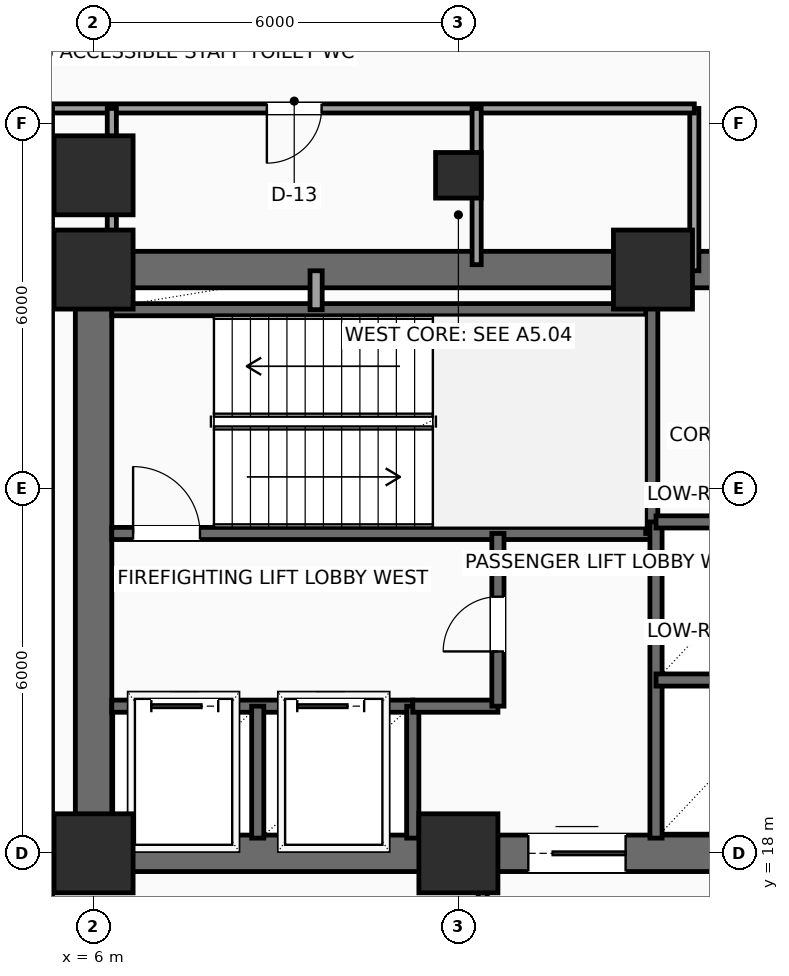
"""IFC4 building model, lengths in metres.
Left out: names, types, materials, properties, quantities, classifications, styles, units other than length and angle.
Written with IfcOpenShell. Run it as: python <this file> out.ifc"""

import sys

from ifc_helpers import new_model, si_unit, direction, frame, frame_2d, origin, origin_2d, place, context, subcontext, project, spatial, rectangle, hollow_rectangle, extrude, element, fill, save


model = new_model("IFC4")
c1 = context("Model", 3, precision=1e-05, world=origin(), true_north=direction((0.0, 1.0)))
c2 = subcontext(c1, "Body", "Model", "MODEL_VIEW")
j1 = project(units=[si_unit("LENGTHUNIT", "METRE"), si_unit("PLANEANGLEUNIT", "RADIAN")], contexts=[c1])
p1 = place(None, origin())
s1 = spatial("IfcSite", under=j1, at=p1, CompositionType="ELEMENT")
p2 = place(p1, origin())
s2 = spatial("IfcBuilding", under=s1, at=p2, CompositionType="ELEMENT")
p3 = place(p2, frame((0.0, 0.0, 71.4)))
s3 = spatial("IfcBuildingStorey", under=s2, at=p3, CompositionType="ELEMENT", Elevation=71.4)
for number, where, z_axis, x_axis in (
    (1, (6.0, 18.0, 0.0), (0.0, 0.0, 1.0), (1.0, 0.0, 0.0)),
    (2, (12.0, 18.0, 0.0), (0.0, 0.0, 1.0), (1.0, 0.0, 0.0)),
    (3, (6.0, 27.6, 0.0), (0.0, 0.0, 1.0), (1.0, 0.0, 0.0)),
    (4, (15.2, 27.6, 0.0), (0.0, 0.0, 1.0), (1.0, 0.0, 0.0)),
    (5, (6.0, 29.15, 0.0), (0.0, 0.0, 1.0), (1.0, 0.0, 0.0)),
):
    element("IfcColumn", number, at=place(p3, frame(where, z_axis=z_axis, x_axis=x_axis)), inside=s3, PredefinedType="COLUMN", context=c2, shape_type="SweptSolid", body=[
        extrude(rectangle(XDim=1.3, YDim=1.3, at=origin_2d()), origin(), (0.0, 0.0, 1.0), 3.9),
    ])
p4 = place(p3, frame((12.0, 29.15, 0.0), z_axis=(0.0, 0.0, 1.0), x_axis=(1.0, 0.0, 0.0)))
e6 = element("IfcColumn", 6, at=p4, inside=s3, PredefinedType="COLUMN", context=c2, shape_type="SweptSolid", body=[
    extrude(hollow_rectangle(XDim=0.75, YDim=0.75, WallThickness=0.035, InnerFilletRadius=0.035, OuterFilletRadius=0.05, at=origin_2d()), origin(), (0.0, 0.0, 1.0), 3.9),
])
p5 = place(p3, frame((6.0, 18.0, 0.0), z_axis=(0.0, 0.0, 1.0), x_axis=(1.0, 0.0, 0.0)))
e7 = element("IfcWall", 7, at=p5, inside=s3, PredefinedType="SHEAR", context=c2, shape_type="SweptSolid", body=[
    extrude(rectangle(XDim=12.0, YDim=0.6, at=frame_2d((6.0, 0.0))), origin(), (0.0, 0.0, 1.0), 3.65),
])
p6 = place(p5, frame((7.15, 0.0, 0.0)))
e8 = element("IfcOpeningElement", 8, at=p6, cuts=e7, PredefinedType="OPENING", context=c2, shape_type="SweptSolid", body=[
    extrude(rectangle(XDim=1.6, YDim=2.3, at=frame_2d((0.8, 1.15))), frame((0.0, 0.31, 0.0), z_axis=(0.0, -1.0, 0.0), x_axis=(1.0, 0.0, 0.0)), (0.0, 0.0, 1.0), 0.62),
])
p7 = place(p3, frame((6.0, 27.6, 0.0), z_axis=(0.0, 0.0, 1.0), x_axis=(1.0, 0.0, 0.0)))
e9 = element("IfcWall", 9, at=p7, inside=s3, PredefinedType="SHEAR", context=c2, shape_type="SweptSolid", body=[
    extrude(rectangle(XDim=12.0, YDim=0.6, at=frame_2d((6.0, 0.0))), origin(), (0.0, 0.0, 1.0), 3.65),
])
p8 = place(p7, frame((10.2, 0.0, 0.0)))
e10 = element("IfcOpeningElement", 10, at=p8, cuts=e9, PredefinedType="OPENING", context=c2, shape_type="SweptSolid", body=[
    extrude(rectangle(XDim=0.9, YDim=2.15, at=frame_2d((0.45, 1.075))), frame((0.0, 0.31, 0.0), z_axis=(0.0, -1.0, 0.0), x_axis=(1.0, 0.0, 0.0)), (0.0, 0.0, 1.0), 0.62),
])
p9 = place(p3, frame((6.0, 18.0, 0.0), z_axis=(0.0, 0.0, 1.0), x_axis=(0.0, 1.0, 0.0)))
e11 = element("IfcWall", 11, at=p9, inside=s3, PredefinedType="SHEAR", context=c2, shape_type="SweptSolid", body=[
    extrude(rectangle(XDim=9.6, YDim=0.6, at=frame_2d((4.8, 0.0))), origin(), (0.0, 0.0, 1.0), 3.65),
])
p10 = place(p3, frame((6.3, 23.26, 0.0), z_axis=(0.0, 0.0, 1.0), x_axis=(1.0, 0.0, 0.0)))
e12 = element("IfcWall", 12, at=p10, inside=s3, PredefinedType="SHEAR", context=c2, shape_type="SweptSolid", body=[
    extrude(rectangle(XDim=8.88, YDim=0.2, at=frame_2d((4.44, 0.0))), origin(), (0.0, 0.0, 1.0), 3.65),
])
p11 = place(p10, frame((0.35, 0.0, 0.0)))
e13 = element("IfcOpeningElement", 13, at=p11, cuts=e12, PredefinedType="OPENING", context=c2, shape_type="SweptSolid", body=[
    extrude(rectangle(XDim=1.1, YDim=2.2, at=frame_2d((0.55, 1.1))), frame((0.0, 0.11, 0.0), z_axis=(0.0, -1.0, 0.0), x_axis=(1.0, 0.0, 0.0)), (0.0, 0.0, 1.0), 0.22),
])
p12 = place(p3, frame((6.3, 26.94, 0.0), z_axis=(0.0, 0.0, 1.0), x_axis=(1.0, 0.0, 0.0)))
e14 = element("IfcWall", 14, at=p12, inside=s3, PredefinedType="SHEAR", context=c2, shape_type="SweptSolid", body=[
    extrude(rectangle(XDim=8.88, YDim=0.2, at=frame_2d((4.44, 0.0))), origin(), (0.0, 0.0, 1.0), 3.65),
])
p13 = place(p3, frame((15.18, 23.26, 0.0), z_axis=(0.0, 0.0, 1.0), x_axis=(0.0, 1.0, 0.0)))
e15 = element("IfcWall", 15, at=p13, inside=s3, PredefinedType="SHEAR", context=c2, shape_type="SweptSolid", body=[
    extrude(rectangle(XDim=4.04, YDim=0.2, at=frame_2d((2.02, 0.0))), origin(), (0.0, 0.0, 1.0), 3.65),
])
p14 = place(p3, frame((6.3, 20.42, 0.0), z_axis=(0.0, 0.0, 1.0), x_axis=(1.0, 0.0, 0.0)))
e16 = element("IfcWall", 16, at=p14, inside=s3, PredefinedType="SHEAR", context=c2, shape_type="SweptSolid", body=[
    extrude(rectangle(XDim=4.95, YDim=0.2, at=frame_2d((2.475, 0.0))), origin(), (0.0, 0.0, 1.0), 3.65),
])
p15 = place(p14, frame((0.65, 0.0, 0.0)))
e17 = element("IfcOpeningElement", 17, at=p15, cuts=e16, PredefinedType="OPENING", context=c2, shape_type="SweptSolid", body=[
    extrude(rectangle(XDim=1.1, YDim=2.2, at=frame_2d((0.55, 1.1))), frame((0.0, 0.11, 0.0), z_axis=(0.0, -1.0, 0.0), x_axis=(1.0, 0.0, 0.0)), (0.0, 0.0, 1.0), 0.22),
])
p16 = place(p14, frame((3.05, 0.0, 0.0)))
e18 = element("IfcOpeningElement", 18, at=p16, cuts=e16, PredefinedType="OPENING", context=c2, shape_type="SweptSolid", body=[
    extrude(rectangle(XDim=1.1, YDim=2.2, at=frame_2d((0.55, 1.1))), frame((0.0, 0.11, 0.0), z_axis=(0.0, -1.0, 0.0), x_axis=(1.0, 0.0, 0.0)), (0.0, 0.0, 1.0), 0.22),
])
for number, where, z_axis, x_axis in (
    (19, (8.7, 18.25, 0.0), (0.0, 0.0, 1.0), (0.0, 1.0, 0.0)),
    (20, (11.25, 18.25, 0.0), (0.0, 0.0, 1.0), (0.0, 1.0, 0.0)),
):
    element("IfcWall", number, at=place(p3, frame(where, z_axis=z_axis, x_axis=x_axis)), inside=s3, PredefinedType="SHEAR", context=c2, shape_type="SweptSolid", body=[
        extrude(rectangle(XDim=2.17, YDim=0.2, at=frame_2d((1.085, 0.0))), origin(), (0.0, 0.0, 1.0), 3.65),
    ])
p17 = place(p3, frame((11.25, 20.42, 0.0), z_axis=(0.0, 0.0, 1.0), x_axis=(1.0, 0.0, 0.0)))
e21 = element("IfcWall", 21, at=p17, inside=s3, PredefinedType="SHEAR", context=c2, shape_type="SweptSolid", body=[
    extrude(rectangle(XDim=1.4, YDim=0.2, at=frame_2d((0.7, 0.0))), origin(), (0.0, 0.0, 1.0), 3.65),
])
p18 = place(p3, frame((12.65, 20.42, 0.0), z_axis=(0.0, 0.0, 1.0), x_axis=(0.0, 1.0, 0.0)))
e22 = element("IfcWall", 22, at=p18, inside=s3, PredefinedType="SHEAR", context=c2, shape_type="SweptSolid", body=[
    extrude(rectangle(XDim=2.84, YDim=0.2, at=frame_2d((1.42, 0.0))), origin(), (0.0, 0.0, 1.0), 3.65),
])
p19 = place(p18, frame((0.9, 0.0, 0.0)))
e23 = element("IfcOpeningElement", 23, at=p19, cuts=e22, PredefinedType="OPENING", context=c2, shape_type="SweptSolid", body=[
    extrude(rectangle(XDim=0.9, YDim=2.15, at=frame_2d((0.45, 1.075))), frame((0.0, 0.11, 0.0), z_axis=(0.0, -1.0, 0.0), x_axis=(1.0, 0.0, 0.0)), (0.0, 0.0, 1.0), 0.22),
])
p20 = place(p3, frame((9.66, 26.94, 0.0), z_axis=(0.0, 0.0, 1.0), x_axis=(0.0, 1.0, 0.0)))
e24 = element("IfcWall", 24, at=p20, inside=s3, PredefinedType="SOLIDWALL", context=c2, shape_type="SweptSolid", body=[
    extrude(rectangle(XDim=0.64, YDim=0.2, at=frame_2d((0.32, 0.0))), origin(), (0.0, 0.0, 1.0), 3.65),
])
p21 = place(p3, frame((15.25, 18.25, 0.0), z_axis=(0.0, 0.0, 1.0), x_axis=(0.0, 1.0, 0.0)))
e25 = element("IfcWall", 25, at=p21, inside=s3, PredefinedType="SHEAR", context=c2, shape_type="SweptSolid", body=[
    extrude(rectangle(XDim=5.2, YDim=0.2, at=frame_2d((2.6, 0.0))), origin(), (0.0, 0.0, 1.0), 3.65),
])
p22 = place(p3, frame((15.25, 20.85, 0.0), z_axis=(0.0, 0.0, 1.0), x_axis=(1.0, 0.0, 0.0)))
e26 = element("IfcWall", 26, at=p22, inside=s3, PredefinedType="SHEAR", context=c2, shape_type="SweptSolid", body=[
    extrude(rectangle(XDim=2.4, YDim=0.2, at=frame_2d((1.2, 0.0))), origin(), (0.0, 0.0, 1.0), 3.65),
])
p23 = place(p3, frame((15.25, 23.45, 0.0), z_axis=(0.0, 0.0, 1.0), x_axis=(1.0, 0.0, 0.0)))
e27 = element("IfcWall", 27, at=p23, inside=s3, PredefinedType="SHEAR", context=c2, shape_type="SweptSolid", body=[
    extrude(rectangle(XDim=2.45, YDim=0.2, at=frame_2d((1.225, 0.0))), origin(), (0.0, 0.0, 1.0), 3.65),
])
p24 = place(p3, frame((15.88, 27.58, 0.0), z_axis=(0.0, 0.0, 1.0), x_axis=(0.0, 1.0, 0.0)))
e28 = element("IfcWall", 28, at=p24, inside=s3, PredefinedType="PARTITIONING", context=c2, shape_type="SweptSolid", body=[
    extrude(rectangle(XDim=2.67, YDim=0.15, at=frame_2d((1.335, 0.0))), origin(), (0.0, 0.0, 1.0), 3.65),
])
p25 = place(p3, frame((15.88, 30.25, 0.0), z_axis=(0.0, 0.0, 1.0), x_axis=(-1.0, 0.0, 0.0)))
e29 = element("IfcWall", 29, at=p25, inside=s3, PredefinedType="PARTITIONING", context=c2, shape_type="SweptSolid", body=[
    extrude(rectangle(XDim=10.63, YDim=0.15, at=frame_2d((5.315, 0.0))), origin(), (0.0, 0.0, 1.0), 3.65),
])
p26 = place(p25, frame((6.13, 0.0, 0.0)))
e30 = element("IfcOpeningElement", 30, at=p26, cuts=e29, PredefinedType="OPENING", context=c2, shape_type="SweptSolid", body=[
    extrude(rectangle(XDim=0.9, YDim=2.1, at=frame_2d((0.45, 1.05))), frame((0.0, 0.085, 0.0), z_axis=(0.0, -1.0, 0.0), x_axis=(1.0, 0.0, 0.0)), (0.0, 0.0, 1.0), 0.17),
])
p27 = place(p3, frame((5.25, 30.25, 0.0), z_axis=(0.0, 0.0, 1.0), x_axis=(0.0, -1.0, 0.0)))
e31 = element("IfcWall", 31, at=p27, inside=s3, PredefinedType="PARTITIONING", context=c2, shape_type="SweptSolid", body=[
    extrude(rectangle(XDim=13.35, YDim=0.15, at=frame_2d((6.675, 0.0))), origin(), (0.0, 0.0, 1.0), 3.65),
])
p28 = place(p3, frame((12.4, 16.9, 0.0), z_axis=(0.0, 0.0, 1.0), x_axis=(0.0, 1.0, 0.0)))
e32 = element("IfcWall", 32, at=p28, inside=s3, PredefinedType="PARTITIONING", context=c2, shape_type="SweptSolid", body=[
    extrude(rectangle(XDim=1.05, YDim=0.15, at=frame_2d((0.525, 0.0))), origin(), (0.0, 0.0, 1.0), 3.65),
])
for number, where, z_axis, x_axis in (
    (33, (6.3, 27.68, 0.0), (0.0, 0.0, 1.0), (0.0, 1.0, 0.0)),
    (34, (12.3, 27.68, 0.0), (0.0, 0.0, 1.0), (0.0, 1.0, 0.0)),
):
    element("IfcWall", number, at=place(p3, frame(where, z_axis=z_axis, x_axis=x_axis)), inside=s3, PredefinedType="PARTITIONING", context=c2, shape_type="SweptSolid", body=[
        extrude(rectangle(XDim=2.57, YDim=0.15, at=frame_2d((1.285, 0.0))), origin(), (0.0, 0.0, 1.0), 2.992),
    ])
p29 = place(p6, origin())
e35 = element("IfcDoor", 35, at=p29, inside=s3, OperationType="DOUBLE_DOOR_SLIDING", PredefinedType="DOOR", context=c2, shape_type="SweptSolid", body=[
    extrude(rectangle(XDim=1.6, YDim=2.3, at=frame_2d((0.8, 1.15))), frame((0.0, 0.025, 0.0), z_axis=(0.0, -1.0, 0.0), x_axis=(1.0, 0.0, 0.0)), (0.0, 0.0, 1.0), 0.05),
])
fill(e8, e35)
p30 = place(p11, origin())
e36 = element("IfcDoor", 36, at=p30, inside=s3, OperationType="SINGLE_SWING_LEFT", PredefinedType="DOOR", context=c2, shape_type="SweptSolid", body=[
    extrude(rectangle(XDim=1.1, YDim=2.2, at=frame_2d((0.55, 1.1))), frame((0.0, 0.025, 0.0), z_axis=(0.0, -1.0, 0.0), x_axis=(1.0, 0.0, 0.0)), (0.0, 0.0, 1.0), 0.05),
])
fill(e13, e36)
p31 = place(p15, origin())
e37 = element("IfcDoor", 37, at=p31, inside=s3, OperationType="SLIDING_TO_LEFT", PredefinedType="DOOR", context=c2, shape_type="SweptSolid", body=[
    extrude(rectangle(XDim=1.1, YDim=2.2, at=frame_2d((0.55, 1.1))), frame((0.0, 0.025, 0.0), z_axis=(0.0, -1.0, 0.0), x_axis=(1.0, 0.0, 0.0)), (0.0, 0.0, 1.0), 0.05),
])
fill(e17, e37)
p32 = place(p16, origin())
e38 = element("IfcDoor", 38, at=p32, inside=s3, OperationType="SLIDING_TO_LEFT", PredefinedType="DOOR", context=c2, shape_type="SweptSolid", body=[
    extrude(rectangle(XDim=1.1, YDim=2.2, at=frame_2d((0.55, 1.1))), frame((0.0, 0.025, 0.0), z_axis=(0.0, -1.0, 0.0), x_axis=(1.0, 0.0, 0.0)), (0.0, 0.0, 1.0), 0.05),
])
fill(e18, e38)
p33 = place(p19, origin())
e39 = element("IfcDoor", 39, at=p33, inside=s3, OperationType="SINGLE_SWING_LEFT", PredefinedType="DOOR", context=c2, shape_type="SweptSolid", body=[
    extrude(rectangle(XDim=0.9, YDim=2.15, at=frame_2d((0.45, 1.075))), frame((0.0, 0.025, 0.0), z_axis=(0.0, -1.0, 0.0), x_axis=(1.0, 0.0, 0.0)), (0.0, 0.0, 1.0), 0.05),
])
fill(e23, e39)
p34 = place(p26, origin())
e40 = element("IfcDoor", 40, at=p34, inside=s3, OperationType="SINGLE_SWING_RIGHT", PredefinedType="DOOR", context=c2, shape_type="SweptSolid", body=[
    extrude(rectangle(XDim=0.9, YDim=2.1, at=frame_2d((0.45, 1.05))), frame((0.0, 0.025, 0.0), z_axis=(0.0, -1.0, 0.0), x_axis=(1.0, 0.0, 0.0)), (0.0, 0.0, 1.0), 0.05),
])
fill(e30, e40)
save(model, sys.argv[1])
